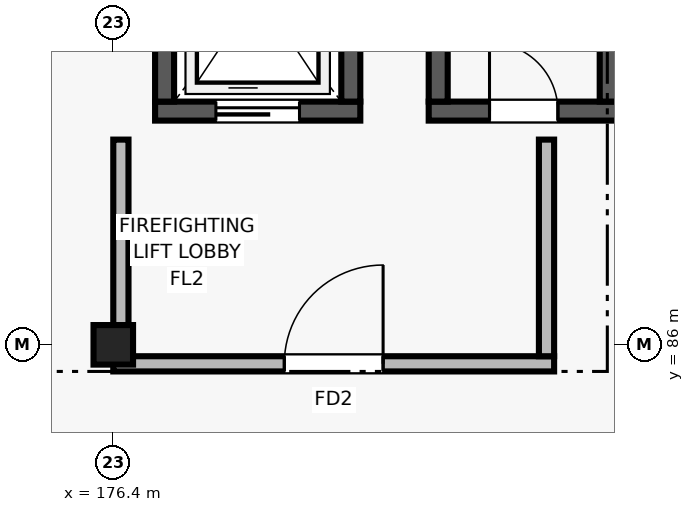
"""IFC4 building model, lengths in metres.
Left out: names, types, materials, properties, quantities, classifications, styles, units other than length and angle.
Written with IfcOpenShell. Run it as: python <this file> out.ifc"""

import sys

from ifc_helpers import new_model, si_unit, direction, frame, frame_2d, origin, origin_2d, place, context, subcontext, project, spatial, rectangle, extrude, element, fill, save


model = new_model("IFC4")
c1 = context("Model", 3, precision=1e-05, world=origin(), true_north=direction((0.0, 1.0)))
c2 = subcontext(c1, "Body", "Model", "MODEL_VIEW")
j1 = project(units=[si_unit("LENGTHUNIT", "METRE"), si_unit("PLANEANGLEUNIT", "RADIAN")], contexts=[c1])
p1 = place(None, origin())
s1 = spatial("IfcSite", under=j1, at=p1, CompositionType="ELEMENT")
p2 = place(p1, origin())
s2 = spatial("IfcBuilding", under=s1, at=p2, CompositionType="ELEMENT")
p3 = place(p2, frame((0.0, 0.0, 21.6)))
s3 = spatial("IfcBuildingStorey", under=s2, at=p3, CompositionType="ELEMENT", Elevation=21.6)
p4 = place(p3, frame((176.4, 86.0, 0.0), z_axis=(0.0, 0.0, 1.0), x_axis=(1.0, 0.0, 0.0)))
e1 = element("IfcColumn", 1, at=p4, inside=s3, PredefinedType="COLUMN", context=c2, shape_type="SweptSolid", body=[
    extrude(rectangle(XDim=0.52, YDim=0.52, at=origin_2d()), origin(), (0.0, 0.0, 1.0), 4.2),
])
p5 = place(p3, frame((176.95, 89.075, 0.0), z_axis=(0.0, 0.0, 1.0), x_axis=(1.0, 0.0, 0.0)))
e2 = element("IfcWall", 2, at=p5, inside=s3, PredefinedType="SHEAR", context=c2, shape_type="SweptSolid", body=[
    extrude(rectangle(XDim=2.7, YDim=0.25, at=frame_2d((1.35, 0.0))), origin(), (0.0, 0.0, 1.0), 3.92),
])
p6 = place(p5, frame((0.8, 0.0, 0.0)))
e3 = element("IfcOpeningElement", 3, at=p6, cuts=e2, PredefinedType="OPENING", context=c2, shape_type="SweptSolid", body=[
    extrude(rectangle(XDim=1.1, YDim=2.15, at=frame_2d((0.55, 1.075))), frame((0.0, 0.135, 0.0), z_axis=(0.0, -1.0, 0.0), x_axis=(1.0, 0.0, 0.0)), (0.0, 0.0, 1.0), 0.27),
])
for number, where, z_axis, x_axis in (
    (4, (177.075, 89.2, 0.0), (0.0, 0.0, 1.0), (0.0, 1.0, 0.0)),
    (5, (179.525, 89.2, 0.0), (0.0, 0.0, 1.0), (0.0, 1.0, 0.0)),
):
    element("IfcWall", number, at=place(p3, frame(where, z_axis=z_axis, x_axis=x_axis)), inside=s3, PredefinedType="SHEAR", context=c2, shape_type="SweptSolid", body=[
        extrude(rectangle(XDim=2.9, YDim=0.25, at=frame_2d((1.45, 0.0))), origin(), (0.0, 0.0, 1.0), 3.92),
    ])
p7 = place(p3, frame((176.4, 85.75, 0.0), z_axis=(0.0, 0.0, 1.0), x_axis=(1.0, 0.0, 0.0)))
e6 = element("IfcWall", 6, at=p7, inside=s3, PredefinedType="SOLIDWALL", context=c2, shape_type="SweptSolid", body=[
    extrude(rectangle(XDim=5.8, YDim=0.2, at=frame_2d((2.9, 0.0))), origin(), (0.0, 0.0, 1.0), 3.92),
])
p8 = place(p7, frame((2.25, 0.0, 0.0)))
e7 = element("IfcOpeningElement", 7, at=p8, cuts=e6, PredefinedType="OPENING", context=c2, shape_type="SweptSolid", body=[
    extrude(rectangle(XDim=1.3, YDim=2.2, at=frame_2d((0.65, 1.1))), frame((0.0, 0.11, 0.0), z_axis=(0.0, -1.0, 0.0), x_axis=(1.0, 0.0, 0.0)), (0.0, 0.0, 1.0), 0.22),
])
p9 = place(p3, frame((176.5, 85.85, 0.0), z_axis=(0.0, 0.0, 1.0), x_axis=(0.0, 1.0, 0.0)))
e8 = element("IfcWall", 8, at=p9, inside=s3, PredefinedType="SOLIDWALL", context=c2, shape_type="SweptSolid", body=[
    extrude(rectangle(XDim=2.85, YDim=0.2, at=frame_2d((1.425, 0.0))), origin(), (0.0, 0.0, 1.0), 3.4),
])
p10 = place(p3, frame((182.1, 85.85, 0.0), z_axis=(0.0, 0.0, 1.0), x_axis=(0.0, 1.0, 0.0)))
e9 = element("IfcWall", 9, at=p10, inside=s3, PredefinedType="SOLIDWALL", context=c2, shape_type="SweptSolid", body=[
    extrude(rectangle(XDim=2.85, YDim=0.2, at=frame_2d((1.425, 0.0))), origin(), (0.0, 0.0, 1.0), 3.92),
])
p11 = place(p3, frame((180.55, 89.075, 0.0), z_axis=(0.0, 0.0, 1.0), x_axis=(1.0, 0.0, 0.0)))
e10 = element("IfcWall", 10, at=p11, inside=s3, PredefinedType="SHEAR", context=c2, shape_type="SweptSolid", body=[
    extrude(rectangle(XDim=2.5, YDim=0.25, at=frame_2d((1.25, 0.0))), origin(), (0.0, 0.0, 1.0), 3.92),
])
p12 = place(p11, frame((0.8, 0.0, 0.0)))
e11 = element("IfcOpeningElement", 11, at=p12, cuts=e10, PredefinedType="OPENING", context=c2, shape_type="SweptSolid", body=[
    extrude(rectangle(XDim=0.9, YDim=2.05, at=frame_2d((0.45, 1.025))), frame((0.0, 0.135, 0.0), z_axis=(0.0, -1.0, 0.0), x_axis=(1.0, 0.0, 0.0)), (0.0, 0.0, 1.0), 0.27),
])
for number, where, z_axis, x_axis in (
    (12, (180.675, 89.2, 0.0), (0.0, 0.0, 1.0), (0.0, 1.0, 0.0)),
    (13, (182.925, 89.2, 0.0), (0.0, 0.0, 1.0), (0.0, 1.0, 0.0)),
):
    element("IfcWall", number, at=place(p3, frame(where, z_axis=z_axis, x_axis=x_axis)), inside=s3, PredefinedType="SHEAR", context=c2, shape_type="SweptSolid", body=[
        extrude(rectangle(XDim=2.9, YDim=0.25, at=frame_2d((1.45, 0.0))), origin(), (0.0, 0.0, 1.0), 3.92),
    ])
p13 = place(p8, origin())
e14 = element("IfcDoor", 14, at=p13, inside=s3, OperationType="SINGLE_SWING_RIGHT", PredefinedType="DOOR", context=c2, shape_type="SweptSolid", body=[
    extrude(rectangle(XDim=1.3, YDim=2.2, at=frame_2d((0.65, 1.1))), frame((0.0, 0.025, 0.0), z_axis=(0.0, -1.0, 0.0), x_axis=(1.0, 0.0, 0.0)), (0.0, 0.0, 1.0), 0.05),
])
fill(e7, e14)
p14 = place(p12, origin())
e15 = element("IfcDoor", 15, at=p14, inside=s3, OperationType="SINGLE_SWING_LEFT", PredefinedType="DOOR", context=c2, shape_type="SweptSolid", body=[
    extrude(rectangle(XDim=0.9, YDim=2.05, at=frame_2d((0.45, 1.025))), frame((0.0, 0.025, 0.0), z_axis=(0.0, -1.0, 0.0), x_axis=(1.0, 0.0, 0.0)), (0.0, 0.0, 1.0), 0.05),
])
fill(e11, e15)
p15 = place(p6, origin())
e16 = element("IfcDoor", 16, at=p15, inside=s3, OperationType="SLIDING_TO_LEFT", PredefinedType="DOOR", context=c2, shape_type="SweptSolid", body=[
    extrude(rectangle(XDim=1.1, YDim=2.15, at=frame_2d((0.55, 1.075))), frame((0.0, 0.025, 0.0), z_axis=(0.0, -1.0, 0.0), x_axis=(1.0, 0.0, 0.0)), (0.0, 0.0, 1.0), 0.05),
])
fill(e3, e16)
save(model, sys.argv[1])
